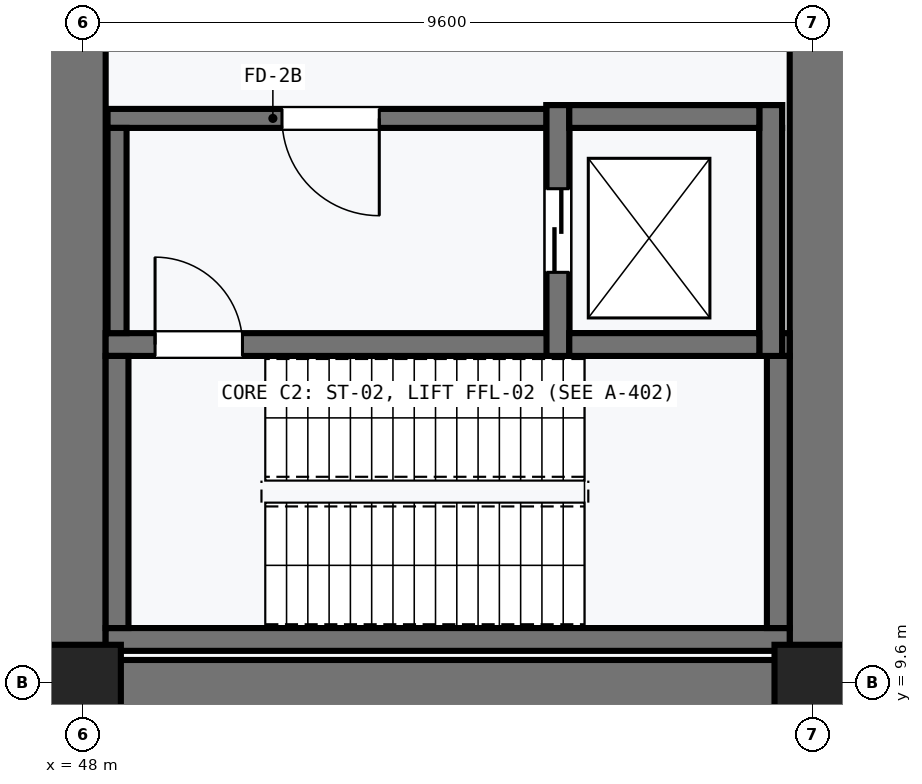
"""IFC4 building model, lengths in metres.
Left out: names, types, materials, properties, quantities, classifications, styles, units other than length and angle.
Written with IfcOpenShell. Run it as: python <this file> out.ifc"""

import sys

from ifc_helpers import new_model, si_unit, direction, frame, frame_2d, origin, origin_2d, place, context, subcontext, project, spatial, rectangle, extrude, element, fill, save


model = new_model("IFC4")
c1 = context("Model", 3, precision=1e-05, world=origin(), true_north=direction((0.0, 1.0)))
c2 = subcontext(c1, "Body", "Model", "MODEL_VIEW")
j1 = project(units=[si_unit("LENGTHUNIT", "METRE"), si_unit("PLANEANGLEUNIT", "RADIAN")], contexts=[c1])
p1 = place(None, origin())
s1 = spatial("IfcSite", under=j1, at=p1, CompositionType="ELEMENT")
p2 = place(p1, origin())
s2 = spatial("IfcBuilding", under=s1, at=p2, CompositionType="ELEMENT")
p3 = place(p2, frame((0.0, 0.0, -10.8)))
s3 = spatial("IfcBuildingStorey", under=s2, at=p3, CompositionType="ELEMENT", Elevation=-10.8)
p4 = place(p3, frame((57.7, 38.3, 0.0), z_axis=(0.0, 0.0, 1.0), x_axis=(0.0, -1.0, 0.0)))
e1 = element("IfcWall", 1, at=p4, inside=s3, PredefinedType="SOLIDWALL", context=c2, shape_type="SweptSolid", body=[
    extrude(rectangle(XDim=28.8, YDim=0.8, at=frame_2d((14.4, 0.0))), origin(), (0.0, 0.0, 1.0), 5.05),
])
p5 = place(p3, frame((57.7, 9.5, 0.0), z_axis=(0.0, 0.0, 1.0), x_axis=(-1.0, 0.0, 0.0)))
e2 = element("IfcWall", 2, at=p5, inside=s3, PredefinedType="SOLIDWALL", context=c2, shape_type="SweptSolid", body=[
    extrude(rectangle(XDim=9.8, YDim=0.8, at=frame_2d((4.9, 0.0))), origin(), (0.0, 0.0, 1.0), 5.05),
])
p6 = place(p3, frame((47.9, 9.5, 0.0), z_axis=(0.0, 0.0, 1.0), x_axis=(0.0, 1.0, 0.0)))
e3 = element("IfcWall", 3, at=p6, inside=s3, PredefinedType="SOLIDWALL", context=c2, shape_type="SweptSolid", body=[
    extrude(rectangle(XDim=28.8, YDim=0.8, at=frame_2d((14.4, 0.0))), origin(), (0.0, 0.0, 1.0), 5.05),
])
for number, where, z_axis, x_axis in (
    (4, (48.0, 9.6, 0.0), (0.0, 0.0, 1.0), (1.0, 0.0, 0.0)),
    (5, (57.6, 9.6, 0.0), (0.0, 0.0, 1.0), (1.0, 0.0, 0.0)),
):
    element("IfcColumn", number, at=place(p3, frame(where, z_axis=z_axis, x_axis=x_axis)), inside=s3, PredefinedType="COLUMN", context=c2, shape_type="SweptSolid", body=[
        extrude(rectangle(XDim=1.0, YDim=1.0, at=origin_2d()), origin(), (0.0, 0.0, 1.0), 5.05),
    ])
p7 = place(p3, frame((48.3, 10.17, 0.0), z_axis=(0.0, 0.0, 1.0), x_axis=(1.0, 0.0, 0.0)))
e6 = element("IfcWall", 6, at=p7, inside=s3, PredefinedType="SHEAR", context=c2, shape_type="SweptSolid", body=[
    extrude(rectangle(XDim=9.0, YDim=0.3, at=frame_2d((4.5, 0.0))), origin(), (0.0, 0.0, 1.0), 5.05),
])
p8 = place(p3, frame((57.3, 14.05, 0.0), z_axis=(0.0, 0.0, 1.0), x_axis=(-1.0, 0.0, 0.0)))
e7 = element("IfcWall", 7, at=p8, inside=s3, PredefinedType="SHEAR", context=c2, shape_type="SweptSolid", body=[
    extrude(rectangle(XDim=9.0, YDim=0.3, at=frame_2d((4.5, 0.0))), origin(), (0.0, 0.0, 1.0), 5.05),
])
p9 = place(p8, frame((7.2, 0.0, 0.0)))
e8 = element("IfcOpeningElement", 8, at=p9, cuts=e7, PredefinedType="OPENING", context=c2, shape_type="SweptSolid", body=[
    extrude(rectangle(XDim=1.15, YDim=2.15, at=frame_2d((0.575, 1.075))), frame((0.0, 0.16, 0.0), z_axis=(0.0, -1.0, 0.0), x_axis=(1.0, 0.0, 0.0)), (0.0, 0.0, 1.0), 0.32),
])
for number, where, z_axis, x_axis in (
    (9, (48.45, 10.32, 0.0), (0.0, 0.0, 1.0), (0.0, 1.0, 0.0)),
    (10, (57.15, 13.9, 0.0), (0.0, 0.0, 1.0), (0.0, -1.0, 0.0)),
):
    element("IfcWall", number, at=place(p3, frame(where, z_axis=z_axis, x_axis=x_axis)), inside=s3, PredefinedType="SHEAR", context=c2, shape_type="SweptSolid", body=[
        extrude(rectangle(XDim=3.58, YDim=0.3, at=frame_2d((1.79, 0.0))), origin(), (0.0, 0.0, 1.0), 5.05),
    ])
p10 = place(p3, frame((54.25, 16.9, 0.0), z_axis=(0.0, 0.0, 1.0), x_axis=(0.0, -1.0, 0.0)))
e11 = element("IfcWall", 11, at=p10, inside=s3, PredefinedType="SHEAR", context=c2, shape_type="SweptSolid", body=[
    extrude(rectangle(XDim=2.7, YDim=0.3, at=frame_2d((1.35, 0.0))), origin(), (0.0, 0.0, 1.0), 5.05),
])
p11 = place(p10, frame((0.8, 0.0, 0.0)))
e12 = element("IfcOpeningElement", 12, at=p11, cuts=e11, PredefinedType="OPENING", context=c2, shape_type="SweptSolid", body=[
    extrude(rectangle(XDim=1.1, YDim=2.1, at=frame_2d((0.55, 1.05))), frame((0.0, 0.16, 0.0), z_axis=(0.0, -1.0, 0.0), x_axis=(1.0, 0.0, 0.0)), (0.0, 0.0, 1.0), 0.32),
])
p12 = place(p3, frame((57.05, 14.2, 0.0), z_axis=(0.0, 0.0, 1.0), x_axis=(0.0, 1.0, 0.0)))
e13 = element("IfcWall", 13, at=p12, inside=s3, PredefinedType="SHEAR", context=c2, shape_type="SweptSolid", body=[
    extrude(rectangle(XDim=2.7, YDim=0.3, at=frame_2d((1.35, 0.0))), origin(), (0.0, 0.0, 1.0), 5.05),
])
p13 = place(p3, frame((54.1, 17.05, 0.0), z_axis=(0.0, 0.0, 1.0), x_axis=(1.0, 0.0, 0.0)))
e14 = element("IfcWall", 14, at=p13, inside=s3, PredefinedType="SHEAR", context=c2, shape_type="SweptSolid", body=[
    extrude(rectangle(XDim=3.1, YDim=0.3, at=frame_2d((1.55, 0.0))), origin(), (0.0, 0.0, 1.0), 5.05),
])
p14 = place(p3, frame((54.1, 17.025, 0.0), z_axis=(0.0, 0.0, 1.0), x_axis=(-1.0, 0.0, 0.0)))
e15 = element("IfcWall", 15, at=p14, inside=s3, PredefinedType="SHEAR", context=c2, shape_type="SweptSolid", body=[
    extrude(rectangle(XDim=5.775, YDim=0.25, at=frame_2d((2.888, 0.0))), origin(), (0.0, 0.0, 1.0), 5.05),
])
p15 = place(p14, frame((2.2, 0.0, 0.0)))
e16 = element("IfcOpeningElement", 16, at=p15, cuts=e15, PredefinedType="OPENING", context=c2, shape_type="SweptSolid", body=[
    extrude(rectangle(XDim=1.28, YDim=2.2, at=frame_2d((0.64, 1.1))), frame((0.0, 0.135, 0.0), z_axis=(0.0, -1.0, 0.0), x_axis=(1.0, 0.0, 0.0)), (0.0, 0.0, 1.0), 0.27),
])
p16 = place(p3, frame((48.45, 14.2, 0.0), z_axis=(0.0, 0.0, 1.0), x_axis=(0.0, 1.0, 0.0)))
e17 = element("IfcWall", 17, at=p16, inside=s3, PredefinedType="SHEAR", context=c2, shape_type="SweptSolid", body=[
    extrude(rectangle(XDim=2.7, YDim=0.25, at=frame_2d((1.35, 0.0))), origin(), (0.0, 0.0, 1.0), 5.05),
])
for number, where, z_axis, x_axis in (
    (18, (54.25, 13.9, -1.2), (0.0, 0.0, 1.0), (0.0, 1.0, 0.0)),
    (19, (57.05, 13.9, -1.2), (0.0, 0.0, 1.0), (0.0, 1.0, 0.0)),
):
    element("IfcWall", number, at=place(p3, frame(where, z_axis=z_axis, x_axis=x_axis)), inside=s3, PredefinedType="SHEAR", context=c2, shape_type="SweptSolid", body=[
        extrude(rectangle(XDim=3.3, YDim=0.3, at=frame_2d((1.65, 0.0))), origin(), (0.0, 0.0, 1.0), 0.32),
    ])
for number, where, z_axis, x_axis in (
    (20, (54.4, 14.05, -1.2), (0.0, 0.0, 1.0), (1.0, 0.0, 0.0)),
    (21, (54.4, 17.05, -1.2), (0.0, 0.0, 1.0), (1.0, 0.0, 0.0)),
):
    element("IfcWall", number, at=place(p3, frame(where, z_axis=z_axis, x_axis=x_axis)), inside=s3, PredefinedType="SHEAR", context=c2, shape_type="SweptSolid", body=[
        extrude(rectangle(XDim=2.5, YDim=0.3, at=frame_2d((1.25, 0.0))), origin(), (0.0, 0.0, 1.0), 0.32),
    ])
p17 = place(p9, frame((1.15, 0.0, 0.0), z_axis=(0.0, 0.0, 1.0), x_axis=(-1.0, 0.0, 0.0)))
e22 = element("IfcDoor", 22, at=p17, inside=s3, OperationType="SINGLE_SWING_RIGHT", PredefinedType="DOOR", context=c2, shape_type="SweptSolid", body=[
    extrude(rectangle(XDim=1.15, YDim=2.15, at=frame_2d((0.575, 1.075))), frame((0.0, 0.025, 0.0), z_axis=(0.0, -1.0, 0.0), x_axis=(1.0, 0.0, 0.0)), (0.0, 0.0, 1.0), 0.05),
])
fill(e8, e22)
p18 = place(p11, frame((1.1, 0.0, 0.0), z_axis=(0.0, 0.0, 1.0), x_axis=(-1.0, 0.0, 0.0)))
e23 = element("IfcDoor", 23, at=p18, inside=s3, OperationType="DOUBLE_DOOR_SLIDING", PredefinedType="DOOR", context=c2, shape_type="SweptSolid", body=[
    extrude(rectangle(XDim=1.1, YDim=2.1, at=frame_2d((0.55, 1.05))), frame((0.0, 0.025, 0.0), z_axis=(0.0, -1.0, 0.0), x_axis=(1.0, 0.0, 0.0)), (0.0, 0.0, 1.0), 0.05),
])
fill(e12, e23)
p19 = place(p15, origin())
e24 = element("IfcDoor", 24, at=p19, inside=s3, OperationType="SINGLE_SWING_LEFT", PredefinedType="DOOR", context=c2, shape_type="SweptSolid", body=[
    extrude(rectangle(XDim=1.28, YDim=2.2, at=frame_2d((0.64, 1.1))), frame((0.0, 0.025, 0.0), z_axis=(0.0, -1.0, 0.0), x_axis=(1.0, 0.0, 0.0)), (0.0, 0.0, 1.0), 0.05),
])
fill(e16, e24)
save(model, sys.argv[1])
